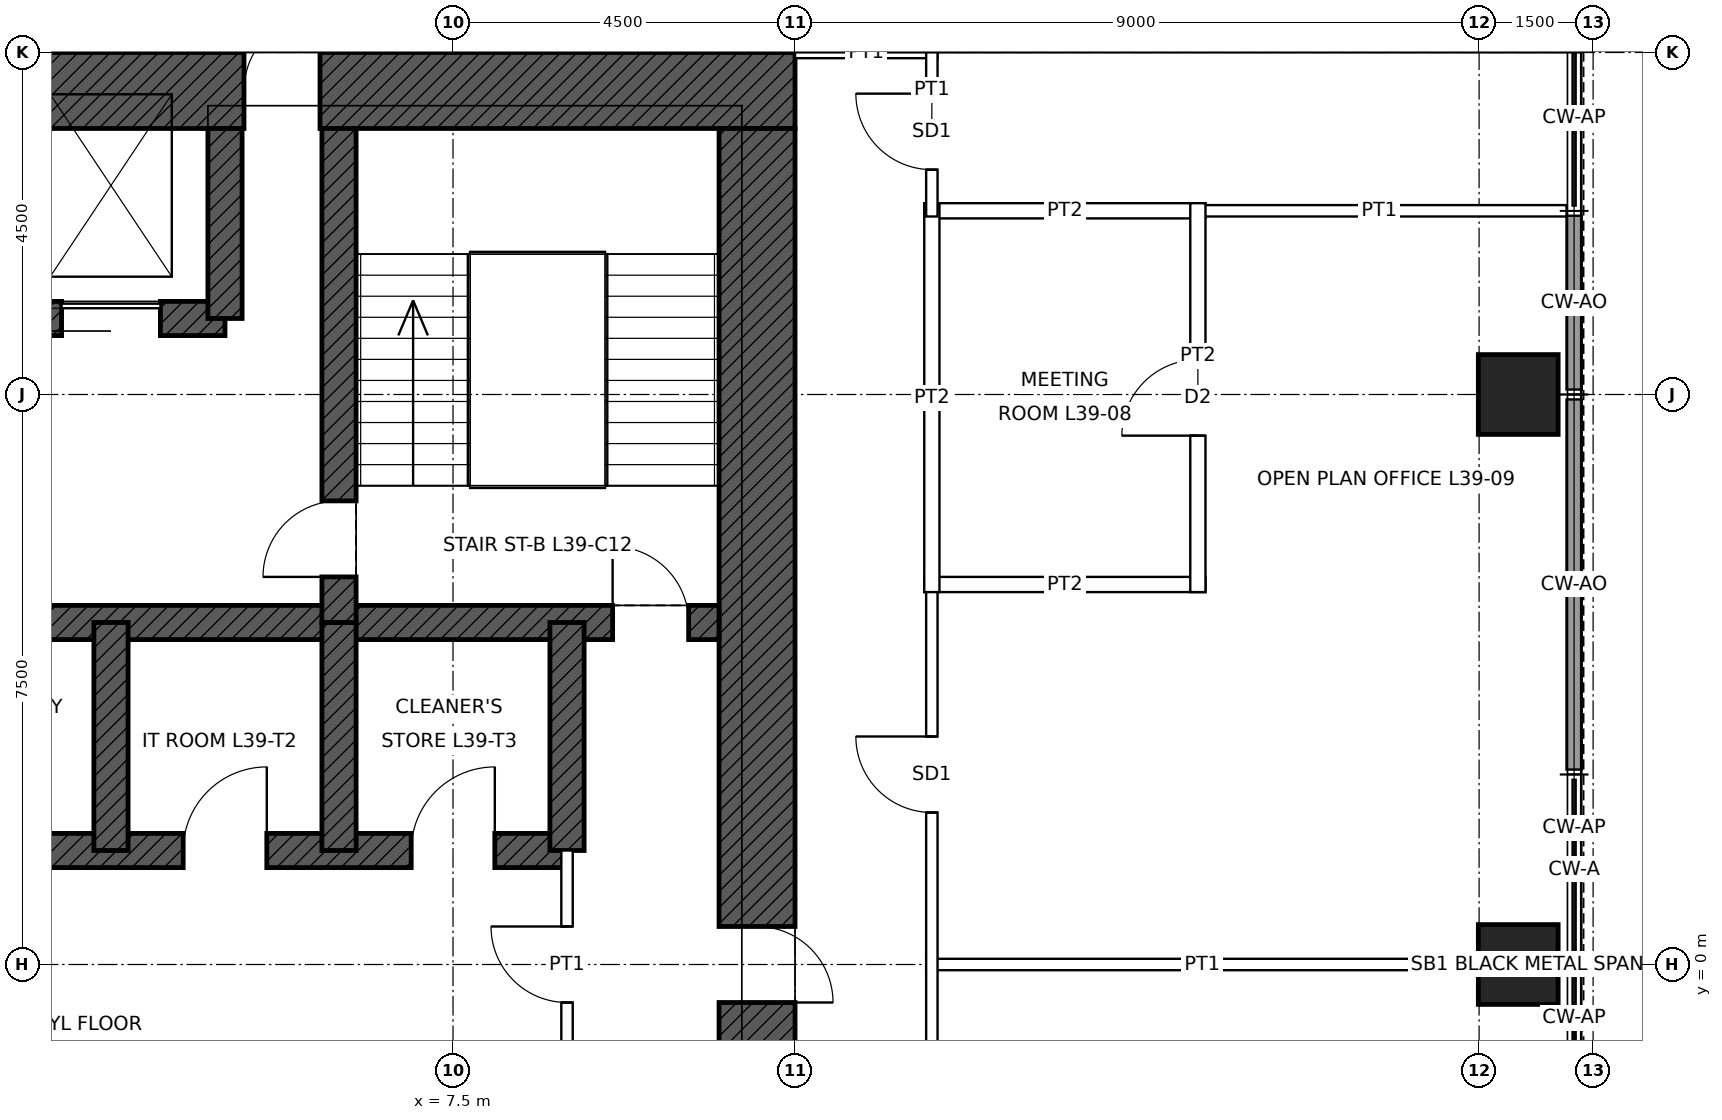
"""IFC4 building model, lengths in metres.
Left out: names, types, materials, properties, quantities, classifications, styles, units other than length and angle.
Written with IfcOpenShell. Run it as: python <this file> out.ifc"""

import sys

from ifc_helpers import new_model, si_unit, direction, frame, frame_2d, origin, origin_2d, place, context, subcontext, project, spatial, rectangle, hollow_rectangle, extrude, element, fill, save


model = new_model("IFC4")
c1 = context("Model", 3, precision=1e-05, world=origin(), true_north=direction((0.0, 1.0)))
c2 = subcontext(c1, "Body", "Model", "MODEL_VIEW")
j1 = project(units=[si_unit("LENGTHUNIT", "METRE"), si_unit("PLANEANGLEUNIT", "RADIAN")], contexts=[c1])
p1 = place(None, origin())
s1 = spatial("IfcSite", under=j1, at=p1, CompositionType="ELEMENT")
p2 = place(p1, origin())
s2 = spatial("IfcBuilding", under=s1, at=p2, CompositionType="ELEMENT")
p3 = place(p2, frame((0.0, 0.0, 189.9)))
s3 = spatial("IfcBuildingStorey", under=s2, at=p3, CompositionType="ELEMENT", Elevation=189.9)
for number, where, z_axis, x_axis in (
    (1, (21.515, 7.5, 0.0), (0.0, 0.0, 1.0), (1.0, 0.0, 0.0)),
    (2, (21.515, 0.0, 0.0), (0.0, 0.0, 1.0), (1.0, 0.0, 0.0)),
):
    element("IfcColumn", number, at=place(p3, frame(where, z_axis=z_axis, x_axis=x_axis)), inside=s3, PredefinedType="COLUMN", context=c2, shape_type="SweptSolid", body=[
        extrude(hollow_rectangle(XDim=1.05, YDim=1.05, WallThickness=0.07, at=origin_2d()), origin(), (0.0, 0.0, 1.0), 4.0),
    ])
p4 = place(p3, frame((-12.0, 11.5, 0.0), z_axis=(0.0, 0.0, 1.0), x_axis=(1.0, 0.0, 0.0)))
e3 = element("IfcWall", 3, at=p4, inside=s3, PredefinedType="SHEAR", context=c2, shape_type="SweptSolid", body=[
    extrude(rectangle(XDim=24.0, YDim=1.0, at=frame_2d((12.0, 0.0))), origin(), (0.0, 0.0, 1.0), 4.0),
])
p5 = place(p4, frame((6.25, 0.0, 0.0)))
e4 = element("IfcOpeningElement", 4, at=p5, cuts=e3, PredefinedType="OPENING", context=c2, shape_type="SweptSolid", body=[
    extrude(rectangle(XDim=1.0, YDim=2.4, at=frame_2d((0.5, 1.2))), frame((0.0, 0.51, 0.0), z_axis=(0.0, -1.0, 0.0), x_axis=(1.0, 0.0, 0.0)), (0.0, 0.0, 1.0), 1.02),
])
p6 = place(p4, frame((16.75, 0.0, 0.0)))
e5 = element("IfcOpeningElement", 5, at=p6, cuts=e3, PredefinedType="OPENING", context=c2, shape_type="SweptSolid", body=[
    extrude(rectangle(XDim=1.0, YDim=2.4, at=frame_2d((0.5, 1.2))), frame((0.0, 0.51, 0.0), z_axis=(0.0, -1.0, 0.0), x_axis=(1.0, 0.0, 0.0)), (0.0, 0.0, 1.0), 1.02),
])
p7 = place(p3, frame((11.5, 11.0, 0.0), z_axis=(0.0, 0.0, 1.0), x_axis=(0.0, -1.0, 0.0)))
e6 = element("IfcWall", 6, at=p7, inside=s3, PredefinedType="SHEAR", context=c2, shape_type="SweptSolid", body=[
    extrude(rectangle(XDim=22.0, YDim=1.0, at=frame_2d((11.0, 0.0))), origin(), (0.0, 0.0, 1.0), 4.0),
])
p8 = place(p7, frame((10.5, 0.0, 0.0)))
e7 = element("IfcOpeningElement", 7, at=p8, cuts=e6, PredefinedType="OPENING", context=c2, shape_type="SweptSolid", body=[
    extrude(rectangle(XDim=1.0, YDim=2.4, at=frame_2d((0.5, 1.2))), frame((0.0, 0.51, 0.0), z_axis=(0.0, -1.0, 0.0), x_axis=(1.0, 0.0, 0.0)), (0.0, 0.0, 1.0), 1.02),
])
p9 = place(p3, frame((-11.0, 4.5, 0.0), z_axis=(0.0, 0.0, 1.0), x_axis=(1.0, 0.0, 0.0)))
e8 = element("IfcWall", 8, at=p9, inside=s3, PredefinedType="SHEAR", context=c2, shape_type="SweptSolid", body=[
    extrude(rectangle(XDim=22.0, YDim=0.45, at=frame_2d((11.0, 0.0))), origin(), (0.0, 0.0, 1.0), 4.0),
])
p10 = place(p9, frame((0.4, 0.0, 0.0)))
e9 = element("IfcOpeningElement", 9, at=p10, cuts=e8, PredefinedType="OPENING", context=c2, shape_type="SweptSolid", body=[
    extrude(rectangle(XDim=1.0, YDim=2.1, at=frame_2d((0.5, 1.05))), frame((0.0, 0.235, 0.0), z_axis=(0.0, -1.0, 0.0), x_axis=(1.0, 0.0, 0.0)), (0.0, 0.0, 1.0), 0.47),
])
p11 = place(p9, frame((20.6, 0.0, 0.0)))
e10 = element("IfcOpeningElement", 10, at=p11, cuts=e8, PredefinedType="OPENING", context=c2, shape_type="SweptSolid", body=[
    extrude(rectangle(XDim=1.0, YDim=2.1, at=frame_2d((0.5, 1.05))), frame((0.0, 0.235, 0.0), z_axis=(0.0, -1.0, 0.0), x_axis=(1.0, 0.0, 0.0)), (0.0, 0.0, 1.0), 0.47),
])
p12 = place(p3, frame((-9.0, 1.5, 0.0), z_axis=(0.0, 0.0, 1.0), x_axis=(1.0, 0.0, 0.0)))
e11 = element("IfcWall", 11, at=p12, inside=s3, PredefinedType="SHEAR", context=c2, shape_type="SweptSolid", body=[
    extrude(rectangle(XDim=18.0, YDim=0.45, at=frame_2d((9.0, 0.0))), origin(), (0.0, 0.0, 1.0), 4.0),
])
p13 = place(p12, frame((0.95, 0.0, 0.0)))
e12 = element("IfcOpeningElement", 12, at=p13, cuts=e11, PredefinedType="OPENING", context=c2, shape_type="SweptSolid", body=[
    extrude(rectangle(XDim=1.1, YDim=2.1, at=frame_2d((0.55, 1.05))), frame((0.0, 0.235, 0.0), z_axis=(0.0, -1.0, 0.0), x_axis=(1.0, 0.0, 0.0)), (0.0, 0.0, 1.0), 0.47),
])
p14 = place(p12, frame((3.95, 0.0, 0.0)))
e13 = element("IfcOpeningElement", 13, at=p14, cuts=e11, PredefinedType="OPENING", context=c2, shape_type="SweptSolid", body=[
    extrude(rectangle(XDim=1.1, YDim=2.1, at=frame_2d((0.55, 1.05))), frame((0.0, 0.235, 0.0), z_axis=(0.0, -1.0, 0.0), x_axis=(1.0, 0.0, 0.0)), (0.0, 0.0, 1.0), 0.47),
])
p15 = place(p12, frame((6.95, 0.0, 0.0)))
e14 = element("IfcOpeningElement", 14, at=p15, cuts=e11, PredefinedType="OPENING", context=c2, shape_type="SweptSolid", body=[
    extrude(rectangle(XDim=1.1, YDim=2.1, at=frame_2d((0.55, 1.05))), frame((0.0, 0.235, 0.0), z_axis=(0.0, -1.0, 0.0), x_axis=(1.0, 0.0, 0.0)), (0.0, 0.0, 1.0), 0.47),
])
p16 = place(p12, frame((9.95, 0.0, 0.0)))
e15 = element("IfcOpeningElement", 15, at=p16, cuts=e11, PredefinedType="OPENING", context=c2, shape_type="SweptSolid", body=[
    extrude(rectangle(XDim=1.1, YDim=2.1, at=frame_2d((0.55, 1.05))), frame((0.0, 0.235, 0.0), z_axis=(0.0, -1.0, 0.0), x_axis=(1.0, 0.0, 0.0)), (0.0, 0.0, 1.0), 0.47),
])
p17 = place(p12, frame((12.95, 0.0, 0.0)))
e16 = element("IfcOpeningElement", 16, at=p17, cuts=e11, PredefinedType="OPENING", context=c2, shape_type="SweptSolid", body=[
    extrude(rectangle(XDim=1.1, YDim=2.1, at=frame_2d((0.55, 1.05))), frame((0.0, 0.235, 0.0), z_axis=(0.0, -1.0, 0.0), x_axis=(1.0, 0.0, 0.0)), (0.0, 0.0, 1.0), 0.47),
])
p18 = place(p12, frame((15.95, 0.0, 0.0)))
e17 = element("IfcOpeningElement", 17, at=p18, cuts=e11, PredefinedType="OPENING", context=c2, shape_type="SweptSolid", body=[
    extrude(rectangle(XDim=1.1, YDim=2.1, at=frame_2d((0.55, 1.05))), frame((0.0, 0.235, 0.0), z_axis=(0.0, -1.0, 0.0), x_axis=(1.0, 0.0, 0.0)), (0.0, 0.0, 1.0), 0.47),
])
p19 = place(p3, frame((-4.5, 8.5, 0.0), z_axis=(0.0, 0.0, 1.0), x_axis=(1.0, 0.0, 0.0)))
e18 = element("IfcWall", 18, at=p19, inside=s3, PredefinedType="SHEAR", context=c2, shape_type="SweptSolid", body=[
    extrude(rectangle(XDim=9.0, YDim=0.45, at=frame_2d((4.5, 0.0))), origin(), (0.0, 0.0, 1.0), 4.0),
])
p20 = place(p19, frame((0.85, 0.0, 0.0)))
e19 = element("IfcOpeningElement", 19, at=p20, cuts=e18, PredefinedType="OPENING", context=c2, shape_type="SweptSolid", body=[
    extrude(rectangle(XDim=1.3, YDim=2.4, at=frame_2d((0.65, 1.2))), frame((0.0, 0.235, 0.0), z_axis=(0.0, -1.0, 0.0), x_axis=(1.0, 0.0, 0.0)), (0.0, 0.0, 1.0), 0.47),
])
p21 = place(p19, frame((6.85, 0.0, 0.0)))
e20 = element("IfcOpeningElement", 20, at=p21, cuts=e18, PredefinedType="OPENING", context=c2, shape_type="SweptSolid", body=[
    extrude(rectangle(XDim=1.3, YDim=2.4, at=frame_2d((0.65, 1.2))), frame((0.0, 0.235, 0.0), z_axis=(0.0, -1.0, 0.0), x_axis=(1.0, 0.0, 0.0)), (0.0, 0.0, 1.0), 0.47),
])
p22 = place(p19, frame((3.85, 0.0, 0.0)))
e21 = element("IfcOpeningElement", 21, at=p22, cuts=e18, PredefinedType="OPENING", context=c2, shape_type="SweptSolid", body=[
    extrude(rectangle(XDim=1.3, YDim=2.4, at=frame_2d((0.65, 1.2))), frame((0.0, 0.235, 0.0), z_axis=(0.0, -1.0, 0.0), x_axis=(1.0, 0.0, 0.0)), (0.0, 0.0, 1.0), 0.47),
])
for number, where, z_axis, x_axis in (
    (22, (9.0, 1.5, 0.0), (0.0, 0.0, 1.0), (0.0, 1.0, 0.0)),
    (23, (3.0, 1.5, 0.0), (0.0, 0.0, 1.0), (0.0, 1.0, 0.0)),
    (24, (6.0, 1.5, 0.0), (0.0, 0.0, 1.0), (0.0, 1.0, 0.0)),
):
    element("IfcWall", number, at=place(p3, frame(where, z_axis=z_axis, x_axis=x_axis)), inside=s3, PredefinedType="SHEAR", context=c2, shape_type="SweptSolid", body=[
        extrude(rectangle(XDim=3.0, YDim=0.45, at=frame_2d((1.5, 0.0))), origin(), (0.0, 0.0, 1.0), 4.0),
    ])
p23 = place(p3, frame((6.0, 4.5, 0.0), z_axis=(0.0, 0.0, 1.0), x_axis=(0.0, 1.0, 0.0)))
e25 = element("IfcWall", 25, at=p23, inside=s3, PredefinedType="SHEAR", context=c2, shape_type="SweptSolid", body=[
    extrude(rectangle(XDim=6.5, YDim=0.45, at=frame_2d((3.25, 0.0))), origin(), (0.0, 0.0, 1.0), 4.0),
])
p24 = place(p23, frame((0.6, 0.0, 0.0)))
e26 = element("IfcOpeningElement", 26, at=p24, cuts=e25, PredefinedType="OPENING", context=c2, shape_type="SweptSolid", body=[
    extrude(rectangle(XDim=1.0, YDim=2.1, at=frame_2d((0.5, 1.05))), frame((0.0, 0.235, 0.0), z_axis=(0.0, -1.0, 0.0), x_axis=(1.0, 0.0, 0.0)), (0.0, 0.0, 1.0), 0.47),
])
p25 = place(p3, frame((4.5, 8.5, 0.0), z_axis=(0.0, 0.0, 1.0), x_axis=(0.0, 1.0, 0.0)))
e27 = element("IfcWall", 27, at=p25, inside=s3, PredefinedType="SHEAR", context=c2, shape_type="SweptSolid", body=[
    extrude(rectangle(XDim=2.5, YDim=0.45, at=frame_2d((1.25, 0.0))), origin(), (0.0, 0.0, 1.0), 4.0),
])
p26 = place(p3, frame((22.25, 9.852, 0.0), z_axis=(0.0, 0.0, 1.0), x_axis=(0.0, -1.0, 0.0)))
e28 = element("IfcWall", 28, at=p26, inside=s3, PredefinedType="SOLIDWALL", context=c2, shape_type="SweptSolid", body=[
    extrude(rectangle(XDim=2.287, YDim=0.2, at=frame_2d((1.144, 0.0))), origin(), (0.0, 0.0, 1.0), 3.85),
])
for number, where, z_axis, x_axis in (
    (29, (22.25, 7.435, 0.0), (0.0, 0.0, 1.0), (0.0, -1.0, 0.0)),
    (30, (22.25, 4.968, 0.0), (0.0, 0.0, 1.0), (0.0, -1.0, 0.0)),
):
    element("IfcWall", number, at=place(p3, frame(where, z_axis=z_axis, x_axis=x_axis)), inside=s3, PredefinedType="SOLIDWALL", context=c2, shape_type="SweptSolid", body=[
        extrude(rectangle(XDim=2.403, YDim=0.2, at=frame_2d((1.201, 0.0))), origin(), (0.0, 0.0, 1.0), 3.85),
    ])
p27 = place(p3, frame((13.725, 0.0, 0.0), z_axis=(0.0, 0.0, 1.0), x_axis=(1.0, 0.0, 0.0)))
e31 = element("IfcWall", 31, at=p27, inside=s3, PredefinedType="PARTITIONING", context=c2, shape_type="SweptSolid", body=[
    extrude(rectangle(XDim=7.265, YDim=0.15, at=frame_2d((3.632, 0.0))), origin(), (0.0, 0.0, 1.0), 3.238),
])
for number, where, z_axis, x_axis in (
    (32, (13.7, 5.0, 0.0), (0.0, 0.0, 1.0), (1.0, 0.0, 0.0)),
    (33, (13.7, 9.917, 0.0), (0.0, 0.0, 1.0), (1.0, 0.0, 0.0)),
):
    element("IfcWall", number, at=place(p3, frame(where, z_axis=z_axis, x_axis=x_axis)), inside=s3, PredefinedType="PARTITIONING", context=c2, shape_type="SweptSolid", body=[
        extrude(rectangle(XDim=3.7, YDim=0.2, at=frame_2d((1.85, 0.0))), origin(), (0.0, 0.0, 1.0), 3.85),
    ])
p28 = place(p3, frame((17.225, 9.917, 0.0), z_axis=(0.0, 0.0, 1.0), x_axis=(1.0, 0.0, 0.0)))
e34 = element("IfcWall", 34, at=p28, inside=s3, PredefinedType="PARTITIONING", context=c2, shape_type="SweptSolid", body=[
    extrude(rectangle(XDim=4.925, YDim=0.15, at=frame_2d((2.462, 0.0))), origin(), (0.0, 0.0, 1.0), 3.85),
])
p29 = place(p3, frame((12.0, 12.0, 0.0), z_axis=(0.0, 0.0, 1.0), x_axis=(1.0, 0.0, 0.0)))
e35 = element("IfcWall", 35, at=p29, inside=s3, PredefinedType="PARTITIONING", context=c2, shape_type="SweptSolid", body=[
    extrude(rectangle(XDim=1.875, YDim=0.15, at=frame_2d((0.938, 0.0))), origin(), (0.0, 0.0, 1.0), 2.908),
])
p30 = place(p3, frame((13.8, -13.875, 0.0), z_axis=(0.0, 0.0, 1.0), x_axis=(0.0, 1.0, 0.0)))
e36 = element("IfcWall", 36, at=p30, inside=s3, PredefinedType="PARTITIONING", context=c2, shape_type="SweptSolid", body=[
    extrude(rectangle(XDim=18.95, YDim=0.15, at=frame_2d((9.475, 0.0))), origin(), (0.0, 0.0, 1.0), 3.85),
])
p31 = place(p30, frame((15.875, 0.0, 0.0)))
e37 = element("IfcOpeningElement", 37, at=p31, cuts=e36, PredefinedType="OPENING", context=c2, shape_type="SweptSolid", body=[
    extrude(rectangle(XDim=1.0, YDim=2.4, at=frame_2d((0.5, 1.2))), frame((0.0, 0.085, 0.0), z_axis=(0.0, -1.0, 0.0), x_axis=(1.0, 0.0, 0.0)), (0.0, 0.0, 1.0), 0.17),
])
p32 = place(p30, frame((10.875, 0.0, 0.0)))
e38 = element("IfcOpeningElement", 38, at=p32, cuts=e36, PredefinedType="OPENING", context=c2, shape_type="SweptSolid", body=[
    extrude(rectangle(XDim=1.0, YDim=2.4, at=frame_2d((0.5, 1.2))), frame((0.0, 0.085, 0.0), z_axis=(0.0, -1.0, 0.0), x_axis=(1.0, 0.0, 0.0)), (0.0, 0.0, 1.0), 0.17),
])
p33 = place(p3, frame((13.8, 4.9, 0.0), z_axis=(0.0, 0.0, 1.0), x_axis=(0.0, 1.0, 0.0)))
e39 = element("IfcWall", 39, at=p33, inside=s3, PredefinedType="PARTITIONING", context=c2, shape_type="SweptSolid", body=[
    extrude(rectangle(XDim=5.117, YDim=0.2, at=frame_2d((2.559, 0.0))), origin(), (0.0, 0.0, 1.0), 3.85),
])
p34 = place(p3, frame((13.8, 9.842, 0.0), z_axis=(0.0, 0.0, 1.0), x_axis=(0.0, 1.0, 0.0)))
e40 = element("IfcWall", 40, at=p34, inside=s3, PredefinedType="PARTITIONING", context=c2, shape_type="SweptSolid", body=[
    extrude(rectangle(XDim=2.233, YDim=0.15, at=frame_2d((1.116, 0.0))), origin(), (0.0, 0.0, 1.0), 3.85),
])
p35 = place(p34, frame((0.616, 0.0, 0.0)))
e41 = element("IfcOpeningElement", 41, at=p35, cuts=e40, PredefinedType="OPENING", context=c2, shape_type="SweptSolid", body=[
    extrude(rectangle(XDim=1.0, YDim=2.4, at=frame_2d((0.5, 1.2))), frame((0.0, 0.085, 0.0), z_axis=(0.0, -1.0, 0.0), x_axis=(1.0, 0.0, 0.0)), (0.0, 0.0, 1.0), 0.17),
])
p36 = place(p3, frame((17.3, 4.9, 0.0), z_axis=(0.0, 0.0, 1.0), x_axis=(0.0, 1.0, 0.0)))
e42 = element("IfcWall", 42, at=p36, inside=s3, PredefinedType="PARTITIONING", context=c2, shape_type="SweptSolid", body=[
    extrude(rectangle(XDim=5.117, YDim=0.2, at=frame_2d((2.559, 0.0))), origin(), (0.0, 0.0, 1.0), 3.85),
])
p37 = place(p36, frame((2.059, 0.0, 0.0)))
e43 = element("IfcOpeningElement", 43, at=p37, cuts=e42, PredefinedType="OPENING", context=c2, shape_type="SweptSolid", body=[
    extrude(rectangle(XDim=1.0, YDim=2.1, at=frame_2d((0.5, 1.05))), frame((0.0, 0.11, 0.0), z_axis=(0.0, -1.0, 0.0), x_axis=(1.0, 0.0, 0.0)), (0.0, 0.0, 1.0), 0.22),
])
p38 = place(p3, frame((9.0, -1.5, 0.0), z_axis=(0.0, 0.0, 1.0), x_axis=(0.0, 1.0, 0.0)))
e44 = element("IfcWall", 44, at=p38, inside=s3, PredefinedType="PARTITIONING", context=c2, shape_type="SweptSolid", body=[
    extrude(rectangle(XDim=3.0, YDim=0.15, at=frame_2d((1.5, 0.0))), origin(), (0.0, 0.0, 1.0), 3.75),
])
p39 = place(p38, frame((1.0, 0.0, 0.0)))
e45 = element("IfcOpeningElement", 45, at=p39, cuts=e44, PredefinedType="OPENING", context=c2, shape_type="SweptSolid", body=[
    extrude(rectangle(XDim=1.0, YDim=2.4, at=frame_2d((0.5, 1.2))), frame((0.0, 0.085, 0.0), z_axis=(0.0, -1.0, 0.0), x_axis=(1.0, 0.0, 0.0)), (0.0, 0.0, 1.0), 0.17),
])
p40 = place(p11, origin())
e46 = element("IfcDoor", 46, at=p40, inside=s3, OperationType="SINGLE_SWING_LEFT", PredefinedType="DOOR", context=c2, shape_type="SweptSolid", body=[
    extrude(rectangle(XDim=1.0, YDim=2.1, at=frame_2d((0.5, 1.05))), frame((0.0, 0.025, 0.0), z_axis=(0.0, -1.0, 0.0), x_axis=(1.0, 0.0, 0.0)), (0.0, 0.0, 1.0), 0.05),
])
fill(e10, e46)
p41 = place(p24, origin())
e47 = element("IfcDoor", 47, at=p41, inside=s3, OperationType="SINGLE_SWING_LEFT", PredefinedType="DOOR", context=c2, shape_type="SweptSolid", body=[
    extrude(rectangle(XDim=1.0, YDim=2.1, at=frame_2d((0.5, 1.05))), frame((0.0, 0.025, 0.0), z_axis=(0.0, -1.0, 0.0), x_axis=(1.0, 0.0, 0.0)), (0.0, 0.0, 1.0), 0.05),
])
fill(e26, e47)
p42 = place(p6, origin())
e48 = element("IfcDoor", 48, at=p42, inside=s3, OperationType="SINGLE_SWING_RIGHT", PredefinedType="DOOR", context=c2, shape_type="SweptSolid", body=[
    extrude(rectangle(XDim=1.0, YDim=2.4, at=frame_2d((0.5, 1.2))), frame((0.0, 0.485, 0.0), z_axis=(0.0, -1.0, 0.0), x_axis=(1.0, 0.0, 0.0)), (0.0, 0.0, 1.0), 0.05),
])
fill(e5, e48)
p43 = place(p8, origin())
e49 = element("IfcDoor", 49, at=p43, inside=s3, OperationType="SINGLE_SWING_RIGHT", PredefinedType="DOOR", context=c2, shape_type="SweptSolid", body=[
    extrude(rectangle(XDim=1.0, YDim=2.4, at=frame_2d((0.5, 1.2))), frame((0.0, 0.485, 0.0), z_axis=(0.0, -1.0, 0.0), x_axis=(1.0, 0.0, 0.0)), (0.0, 0.0, 1.0), 0.05),
])
fill(e7, e49)
p44 = place(p21, origin())
e50 = element("IfcDoor", 50, at=p44, inside=s3, OperationType="SLIDING_TO_LEFT", PredefinedType="DOOR", context=c2, shape_type="SweptSolid", body=[
    extrude(rectangle(XDim=1.3, YDim=2.4, at=frame_2d((0.65, 1.2))), frame((0.0, 0.025, 0.0), z_axis=(0.0, -1.0, 0.0), x_axis=(1.0, 0.0, 0.0)), (0.0, 0.0, 1.0), 0.05),
])
fill(e20, e50)
p45 = place(p39, origin())
e51 = element("IfcDoor", 51, at=p45, inside=s3, OperationType="SINGLE_SWING_RIGHT", PredefinedType="DOOR", context=c2, shape_type="SweptSolid", body=[
    extrude(rectangle(XDim=1.0, YDim=2.4, at=frame_2d((0.5, 1.2))), frame((0.0, 0.025, 0.0), z_axis=(0.0, -1.0, 0.0), x_axis=(1.0, 0.0, 0.0)), (0.0, 0.0, 1.0), 0.05),
])
fill(e45, e51)
p46 = place(p17, origin())
e52 = element("IfcDoor", 52, at=p46, inside=s3, OperationType="SINGLE_SWING_RIGHT", PredefinedType="DOOR", context=c2, shape_type="SweptSolid", body=[
    extrude(rectangle(XDim=1.1, YDim=2.1, at=frame_2d((0.55, 1.05))), frame((0.0, 0.025, 0.0), z_axis=(0.0, -1.0, 0.0), x_axis=(1.0, 0.0, 0.0)), (0.0, 0.0, 1.0), 0.05),
])
fill(e16, e52)
p47 = place(p18, origin())
e53 = element("IfcDoor", 53, at=p47, inside=s3, OperationType="SINGLE_SWING_RIGHT", PredefinedType="DOOR", context=c2, shape_type="SweptSolid", body=[
    extrude(rectangle(XDim=1.1, YDim=2.1, at=frame_2d((0.55, 1.05))), frame((0.0, 0.025, 0.0), z_axis=(0.0, -1.0, 0.0), x_axis=(1.0, 0.0, 0.0)), (0.0, 0.0, 1.0), 0.05),
])
fill(e17, e53)
p48 = place(p37, origin())
e54 = element("IfcDoor", 54, at=p48, inside=s3, OperationType="SINGLE_SWING_LEFT", PredefinedType="DOOR", context=c2, shape_type="SweptSolid", body=[
    extrude(rectangle(XDim=1.0, YDim=2.1, at=frame_2d((0.5, 1.05))), frame((0.0, 0.025, 0.0), z_axis=(0.0, -1.0, 0.0), x_axis=(1.0, 0.0, 0.0)), (0.0, 0.0, 1.0), 0.05),
])
fill(e43, e54)
p49 = place(p31, origin())
e55 = element("IfcDoor", 55, at=p49, inside=s3, OperationType="SINGLE_SWING_RIGHT", PredefinedType="DOOR", context=c2, shape_type="SweptSolid", body=[
    extrude(rectangle(XDim=1.0, YDim=2.4, at=frame_2d((0.5, 1.2))), frame((0.0, 0.025, 0.0), z_axis=(0.0, -1.0, 0.0), x_axis=(1.0, 0.0, 0.0)), (0.0, 0.0, 1.0), 0.05),
])
fill(e37, e55)
p50 = place(p35, origin())
e56 = element("IfcDoor", 56, at=p50, inside=s3, OperationType="SINGLE_SWING_RIGHT", PredefinedType="DOOR", context=c2, shape_type="SweptSolid", body=[
    extrude(rectangle(XDim=1.0, YDim=2.4, at=frame_2d((0.5, 1.2))), frame((0.0, 0.025, 0.0), z_axis=(0.0, -1.0, 0.0), x_axis=(1.0, 0.0, 0.0)), (0.0, 0.0, 1.0), 0.05),
])
fill(e41, e56)
save(model, sys.argv[1])
